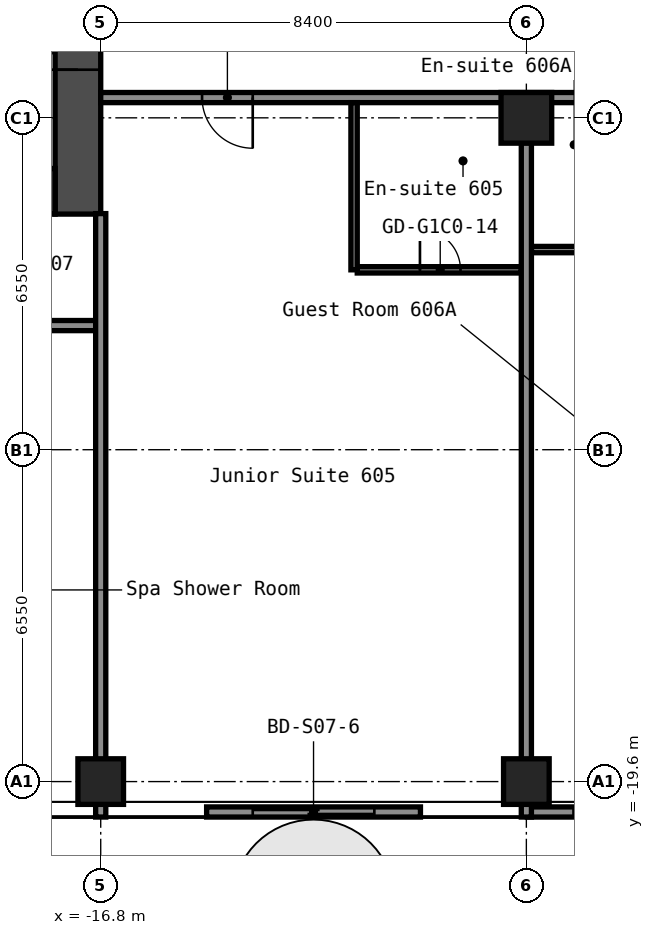
"""IFC4 building model, lengths in metres.
Left out: names, types, materials, properties, quantities, classifications, styles, units other than length and angle.
Written with IfcOpenShell. Run it as: python <this file> out.ifc"""

import sys

from ifc_helpers import new_model, si_unit, direction, frame, frame_2d, origin, origin_2d, place, context, subcontext, project, spatial, rectangle, hollow_rectangle, extrude, element, fill, save


model = new_model("IFC4")
c1 = context("Model", 3, precision=1e-05, world=origin(), true_north=direction((0.0, 1.0)))
c2 = subcontext(c1, "Body", "Model", "MODEL_VIEW")
j1 = project(units=[si_unit("LENGTHUNIT", "METRE"), si_unit("PLANEANGLEUNIT", "RADIAN")], contexts=[c1])
p1 = place(None, origin())
s1 = spatial("IfcSite", under=j1, at=p1, CompositionType="ELEMENT")
p2 = place(p1, origin())
s2 = spatial("IfcBuilding", under=s1, at=p2, CompositionType="ELEMENT")
p3 = place(p2, frame((0.0, 0.0, 26.2)))
s3 = spatial("IfcBuildingStorey", under=s2, at=p3, CompositionType="ELEMENT", Elevation=26.2)
for number, where, z_axis, x_axis in (
    (1, (-16.8, -19.6, 0.0), (0.0, 0.0, 1.0), (1.0, 0.0, 0.0)),
    (2, (-8.4, -19.6, 0.0), (0.0, 0.0, 1.0), (1.0, 0.0, 0.0)),
):
    element("IfcColumn", number, at=place(p3, frame(where, z_axis=z_axis, x_axis=x_axis)), inside=s3, PredefinedType="COLUMN", context=c2, shape_type="SweptSolid", body=[
        extrude(hollow_rectangle(XDim=0.9, YDim=0.9, WallThickness=0.036, at=origin_2d()), origin(), (0.0, 0.0, 1.0), 2.8),
    ])
p4 = place(p3, frame((-8.4, -6.5, 0.0), z_axis=(0.0, 0.0, 1.0), x_axis=(1.0, 0.0, 0.0)))
e3 = element("IfcColumn", 3, at=p4, inside=s3, PredefinedType="COLUMN", context=c2, shape_type="SweptSolid", body=[
    extrude(hollow_rectangle(XDim=1.0, YDim=1.0, WallThickness=0.04, at=origin_2d()), origin(), (0.0, 0.0, 1.0), 2.8),
])
p5 = place(p3, frame((-17.25, -8.4, 0.0), z_axis=(0.0, 0.0, 1.0), x_axis=(0.0, 1.0, 0.0)))
e4 = element("IfcWall", 4, at=p5, inside=s3, PredefinedType="SHEAR", context=c2, shape_type="SweptSolid", body=[
    extrude(rectangle(XDim=16.8, YDim=0.9, at=frame_2d((8.4, 0.0))), origin(), (0.0, 0.0, 1.0), 2.8),
])
p6 = place(p5, frame((12.75, 0.0, 0.0)))
e5 = element("IfcOpeningElement", 5, at=p6, cuts=e4, PredefinedType="OPENING", context=c2, shape_type="SweptSolid", body=[
    extrude(rectangle(XDim=1.2, YDim=2.1, at=frame_2d((0.6, 1.05))), frame((0.0, 0.46, 0.0), z_axis=(0.0, -1.0, 0.0), x_axis=(1.0, 0.0, 0.0)), (0.0, 0.0, 1.0), 0.92),
])
p7 = place(p5, frame((2.85, 0.0, 0.0)))
e6 = element("IfcOpeningElement", 6, at=p7, cuts=e4, PredefinedType="OPENING", context=c2, shape_type="SweptSolid", body=[
    extrude(rectangle(XDim=1.2, YDim=2.1, at=frame_2d((0.6, 1.05))), frame((0.0, 0.46, 0.0), z_axis=(0.0, -1.0, 0.0), x_axis=(1.0, 0.0, 0.0)), (0.0, 0.0, 1.0), 0.92),
])
p8 = place(p3, frame((-32.7, -7.95, 0.0), z_axis=(0.0, 0.0, 1.0), x_axis=(1.0, 0.0, 0.0)))
e7 = element("IfcWall", 7, at=p8, inside=s3, PredefinedType="SHEAR", context=c2, shape_type="SweptSolid", body=[
    extrude(rectangle(XDim=15.0, YDim=0.9, at=frame_2d((7.5, 0.0))), origin(), (0.0, 0.0, 1.0), 2.8),
])
p9 = place(p8, frame((11.45, 0.0, 0.0)))
e8 = element("IfcOpeningElement", 8, at=p9, cuts=e7, PredefinedType="OPENING", context=c2, shape_type="SweptSolid", body=[
    extrude(rectangle(XDim=1.0, YDim=2.1, at=frame_2d((0.5, 1.05))), frame((0.0, 0.46, 0.0), z_axis=(0.0, -1.0, 0.0), x_axis=(1.0, 0.0, 0.0)), (0.0, 0.0, 1.0), 0.92),
])
p10 = place(p3, frame((-51.1, -10.6, 0.0), z_axis=(0.0, 0.0, 1.0), x_axis=(1.0, 0.0, 0.0)))
e9 = element("IfcWall", 9, at=p10, inside=s3, PredefinedType="PARTITIONING", context=c2, shape_type="SweptSolid", body=[
    extrude(rectangle(XDim=34.3, YDim=0.2, at=frame_2d((17.15, 0.0))), origin(), (0.0, 0.0, 1.0), 2.8),
])
p11 = place(p10, frame((4.2, 0.0, 0.0)))
e10 = element("IfcOpeningElement", 10, at=p11, cuts=e9, PredefinedType="OPENING", context=c2, shape_type="SweptSolid", body=[
    extrude(rectangle(XDim=1.0, YDim=2.1, at=frame_2d((0.5, 1.05))), frame((0.0, 0.11, 0.0), z_axis=(0.0, -1.0, 0.0), x_axis=(1.0, 0.0, 0.0)), (0.0, 0.0, 1.0), 0.22),
])
p12 = place(p10, frame((11.34, 0.0, 0.0)))
e11 = element("IfcOpeningElement", 11, at=p12, cuts=e9, PredefinedType="OPENING", context=c2, shape_type="SweptSolid", body=[
    extrude(rectangle(XDim=0.9, YDim=2.1, at=frame_2d((0.45, 1.05))), frame((0.0, 0.11, 0.0), z_axis=(0.0, -1.0, 0.0), x_axis=(1.0, 0.0, 0.0)), (0.0, 0.0, 1.0), 0.22),
])
p13 = place(p10, frame((15.54, 0.0, 0.0)))
e12 = element("IfcOpeningElement", 12, at=p13, cuts=e9, PredefinedType="OPENING", context=c2, shape_type="SweptSolid", body=[
    extrude(rectangle(XDim=0.9, YDim=2.1, at=frame_2d((0.45, 1.05))), frame((0.0, 0.11, 0.0), z_axis=(0.0, -1.0, 0.0), x_axis=(1.0, 0.0, 0.0)), (0.0, 0.0, 1.0), 0.22),
])
p14 = place(p10, frame((21.2, 0.0, 0.0)))
e13 = element("IfcOpeningElement", 13, at=p14, cuts=e9, PredefinedType="OPENING", context=c2, shape_type="SweptSolid", body=[
    extrude(rectangle(XDim=1.0, YDim=2.1, at=frame_2d((0.5, 1.05))), frame((0.0, 0.11, 0.0), z_axis=(0.0, -1.0, 0.0), x_axis=(1.0, 0.0, 0.0)), (0.0, 0.0, 1.0), 0.22),
])
p15 = place(p10, frame((27.97, 0.0, 0.0)))
e14 = element("IfcOpeningElement", 14, at=p15, cuts=e9, PredefinedType="OPENING", context=c2, shape_type="SweptSolid", body=[
    extrude(rectangle(XDim=0.9, YDim=2.1, at=frame_2d((0.45, 1.05))), frame((0.0, 0.11, 0.0), z_axis=(0.0, -1.0, 0.0), x_axis=(1.0, 0.0, 0.0)), (0.0, 0.0, 1.0), 0.22),
])
p16 = place(p10, frame((32.17, 0.0, 0.0)))
e15 = element("IfcOpeningElement", 15, at=p16, cuts=e9, PredefinedType="OPENING", context=c2, shape_type="SweptSolid", body=[
    extrude(rectangle(XDim=0.9, YDim=2.1, at=frame_2d((0.45, 1.05))), frame((0.0, 0.11, 0.0), z_axis=(0.0, -1.0, 0.0), x_axis=(1.0, 0.0, 0.0)), (0.0, 0.0, 1.0), 0.22),
])
p17 = place(p3, frame((-11.738, -9.5, 0.0), z_axis=(0.0, 0.0, 1.0), x_axis=(1.0, 0.0, 0.0)))
e16 = element("IfcWall", 16, at=p17, inside=s3, PredefinedType="PARTITIONING", context=c2, shape_type="SweptSolid", body=[
    extrude(rectangle(XDim=3.238, YDim=0.125, at=frame_2d((1.619, 0.0))), origin(), (0.0, 0.0, 1.0), 2.8),
])
p18 = place(p17, frame((1.238, 0.0, 0.0)))
e17 = element("IfcOpeningElement", 17, at=p18, cuts=e16, PredefinedType="OPENING", context=c2, shape_type="SweptSolid", body=[
    extrude(rectangle(XDim=0.8, YDim=2.1, at=frame_2d((0.4, 1.05))), frame((0.0, 0.073, 0.0), z_axis=(0.0, -1.0, 0.0), x_axis=(1.0, 0.0, 0.0)), (0.0, 0.0, 1.0), 0.145),
])
p19 = place(p3, frame((-8.3, -9.1, 0.0), z_axis=(0.0, 0.0, 1.0), x_axis=(1.0, 0.0, 0.0)))
e18 = element("IfcWall", 18, at=p19, inside=s3, PredefinedType="PARTITIONING", context=c2, shape_type="SweptSolid", body=[
    extrude(rectangle(XDim=2.338, YDim=0.125, at=frame_2d((1.169, 0.0))), origin(), (0.0, 0.0, 1.0), 2.8),
])
p20 = place(p3, frame((-16.8, -6.1, 0.0), z_axis=(0.0, 0.0, 1.0), x_axis=(1.0, 0.0, 0.0)))
e19 = element("IfcWall", 19, at=p20, inside=s3, PredefinedType="PARTITIONING", context=c2, shape_type="SweptSolid", body=[
    extrude(rectangle(XDim=33.6, YDim=0.2, at=frame_2d((16.8, 0.0))), origin(), (0.0, 0.0, 1.0), 2.8),
])
p21 = place(p20, frame((2.0, 0.0, 0.0)))
e20 = element("IfcOpeningElement", 20, at=p21, cuts=e19, PredefinedType="OPENING", context=c2, shape_type="SweptSolid", body=[
    extrude(rectangle(XDim=1.0, YDim=2.1, at=frame_2d((0.5, 1.05))), frame((0.0, 0.11, 0.0), z_axis=(0.0, -1.0, 0.0), x_axis=(1.0, 0.0, 0.0)), (0.0, 0.0, 1.0), 0.22),
])
p22 = place(p20, frame((11.25, 0.0, 0.0)))
e21 = element("IfcOpeningElement", 21, at=p22, cuts=e19, PredefinedType="OPENING", context=c2, shape_type="SweptSolid", body=[
    extrude(rectangle(XDim=1.0, YDim=2.1, at=frame_2d((0.5, 1.05))), frame((0.0, 0.11, 0.0), z_axis=(0.0, -1.0, 0.0), x_axis=(1.0, 0.0, 0.0)), (0.0, 0.0, 1.0), 0.22),
])
p23 = place(p20, frame((12.95, 0.0, 0.0)))
e22 = element("IfcOpeningElement", 22, at=p23, cuts=e19, PredefinedType="OPENING", context=c2, shape_type="SweptSolid", body=[
    extrude(rectangle(XDim=1.0, YDim=2.1, at=frame_2d((0.5, 1.05))), frame((0.0, 0.11, 0.0), z_axis=(0.0, -1.0, 0.0), x_axis=(1.0, 0.0, 0.0)), (0.0, 0.0, 1.0), 0.22),
])
p24 = place(p20, frame((18.28, 0.0, 0.0)))
e23 = element("IfcOpeningElement", 23, at=p24, cuts=e19, PredefinedType="OPENING", context=c2, shape_type="SweptSolid", body=[
    extrude(rectangle(XDim=0.9, YDim=2.1, at=frame_2d((0.45, 1.05))), frame((0.0, 0.11, 0.0), z_axis=(0.0, -1.0, 0.0), x_axis=(1.0, 0.0, 0.0)), (0.0, 0.0, 1.0), 0.22),
])
p25 = place(p20, frame((22.48, 0.0, 0.0)))
e24 = element("IfcOpeningElement", 24, at=p25, cuts=e19, PredefinedType="OPENING", context=c2, shape_type="SweptSolid", body=[
    extrude(rectangle(XDim=0.9, YDim=2.1, at=frame_2d((0.45, 1.05))), frame((0.0, 0.11, 0.0), z_axis=(0.0, -1.0, 0.0), x_axis=(1.0, 0.0, 0.0)), (0.0, 0.0, 1.0), 0.22),
])
p26 = place(p20, frame((28.05, 0.0, 0.0)))
e25 = element("IfcOpeningElement", 25, at=p26, cuts=e19, PredefinedType="OPENING", context=c2, shape_type="SweptSolid", body=[
    extrude(rectangle(XDim=1.0, YDim=2.1, at=frame_2d((0.5, 1.05))), frame((0.0, 0.11, 0.0), z_axis=(0.0, -1.0, 0.0), x_axis=(1.0, 0.0, 0.0)), (0.0, 0.0, 1.0), 0.22),
])
p27 = place(p20, frame((29.75, 0.0, 0.0)))
e26 = element("IfcOpeningElement", 26, at=p27, cuts=e19, PredefinedType="OPENING", context=c2, shape_type="SweptSolid", body=[
    extrude(rectangle(XDim=1.0, YDim=2.1, at=frame_2d((0.5, 1.05))), frame((0.0, 0.11, 0.0), z_axis=(0.0, -1.0, 0.0), x_axis=(1.0, 0.0, 0.0)), (0.0, 0.0, 1.0), 0.22),
])
p28 = place(p3, frame((-16.8, -20.3, 0.0), z_axis=(0.0, 0.0, 1.0), x_axis=(0.0, 1.0, 0.0)))
e27 = element("IfcWall", 27, at=p28, inside=s3, PredefinedType="PARTITIONING", context=c2, shape_type="SweptSolid", body=[
    extrude(rectangle(XDim=11.91, YDim=0.2, at=frame_2d((5.955, 0.0))), origin(), (0.0, 0.0, 1.0), 2.8),
])
p29 = place(p3, frame((-11.8, -9.5, 0.0), z_axis=(0.0, 0.0, 1.0), x_axis=(0.0, 1.0, 0.0)))
e28 = element("IfcWall", 28, at=p29, inside=s3, PredefinedType="PARTITIONING", context=c2, shape_type="SweptSolid", body=[
    extrude(rectangle(XDim=3.3, YDim=0.125, at=frame_2d((1.65, 0.0))), origin(), (0.0, 0.0, 1.0), 2.8),
])
p30 = place(p3, frame((-8.4, -20.3, 0.0), z_axis=(0.0, 0.0, 1.0), x_axis=(0.0, 1.0, 0.0)))
e29 = element("IfcWall", 29, at=p30, inside=s3, PredefinedType="PARTITIONING", context=c2, shape_type="SweptSolid", body=[
    extrude(rectangle(XDim=13.31, YDim=0.2, at=frame_2d((6.655, 0.0))), origin(), (0.0, 0.0, 1.0), 2.8),
])
p31 = place(p3, frame((-14.71, -20.2, 0.0), z_axis=(0.0, 0.0, 1.0), x_axis=(1.0, 0.0, 0.0)))
p32 = place(p31, frame((0.91, 0.0, 0.0)))
p33 = place(p32, frame((2.4, 0.0, 0.0), z_axis=(0.0, 0.0, 1.0), x_axis=(-1.0, 0.0, 0.0)))
e30 = element("IfcDoor", 30, at=p33, inside=s3, OperationType="SLIDING_TO_LEFT", PredefinedType="DOOR", context=c2, shape_type="SweptSolid", body=[
    extrude(rectangle(XDim=2.4, YDim=2.2, at=frame_2d((1.2, 1.1))), frame((0.0, 0.025, 0.0), z_axis=(0.0, -1.0, 0.0), x_axis=(1.0, 0.0, 0.0)), (0.0, 0.0, 1.0), 0.05),
])
p34 = place(p3, frame((-8.38, -20.2, 0.0), z_axis=(0.0, 0.0, 1.0), x_axis=(1.0, 0.0, 0.0)))
p35 = place(p34, frame((0.91, 0.0, 0.0)))
p36 = place(p35, frame((2.4, 0.0, 0.0), z_axis=(0.0, 0.0, 1.0), x_axis=(-1.0, 0.0, 0.0)))
e31 = element("IfcDoor", 31, at=p36, inside=s3, OperationType="SLIDING_TO_LEFT", PredefinedType="DOOR", context=c2, shape_type="SweptSolid", body=[
    extrude(rectangle(XDim=2.4, YDim=2.2, at=frame_2d((1.2, 1.1))), frame((0.0, 0.025, 0.0), z_axis=(0.0, -1.0, 0.0), x_axis=(1.0, 0.0, 0.0)), (0.0, 0.0, 1.0), 0.05),
])
p37 = place(p7, origin())
e32 = element("IfcDoor", 32, at=p37, inside=s3, OperationType="DOUBLE_DOOR_SINGLE_SWING", PredefinedType="DOOR", context=c2, shape_type="SweptSolid", body=[
    extrude(rectangle(XDim=1.2, YDim=2.1, at=frame_2d((0.6, 1.05))), frame((0.0, 0.025, 0.0), z_axis=(0.0, -1.0, 0.0), x_axis=(1.0, 0.0, 0.0)), (0.0, 0.0, 1.0), 0.05),
])
fill(e6, e32)
p38 = place(p18, origin())
e33 = element("IfcDoor", 33, at=p38, inside=s3, OperationType="SINGLE_SWING_RIGHT", PredefinedType="DOOR", context=c2, shape_type="SweptSolid", body=[
    extrude(rectangle(XDim=0.8, YDim=2.1, at=frame_2d((0.4, 1.05))), frame((0.0, 0.025, 0.0), z_axis=(0.0, -1.0, 0.0), x_axis=(1.0, 0.0, 0.0)), (0.0, 0.0, 1.0), 0.05),
])
fill(e17, e33)
p39 = place(p21, origin())
e34 = element("IfcDoor", 34, at=p39, inside=s3, OperationType="SINGLE_SWING_RIGHT", PredefinedType="DOOR", context=c2, shape_type="SweptSolid", body=[
    extrude(rectangle(XDim=1.0, YDim=2.1, at=frame_2d((0.5, 1.05))), frame((0.0, 0.025, 0.0), z_axis=(0.0, -1.0, 0.0), x_axis=(1.0, 0.0, 0.0)), (0.0, 0.0, 1.0), 0.05),
])
fill(e20, e34)
save(model, sys.argv[1])
